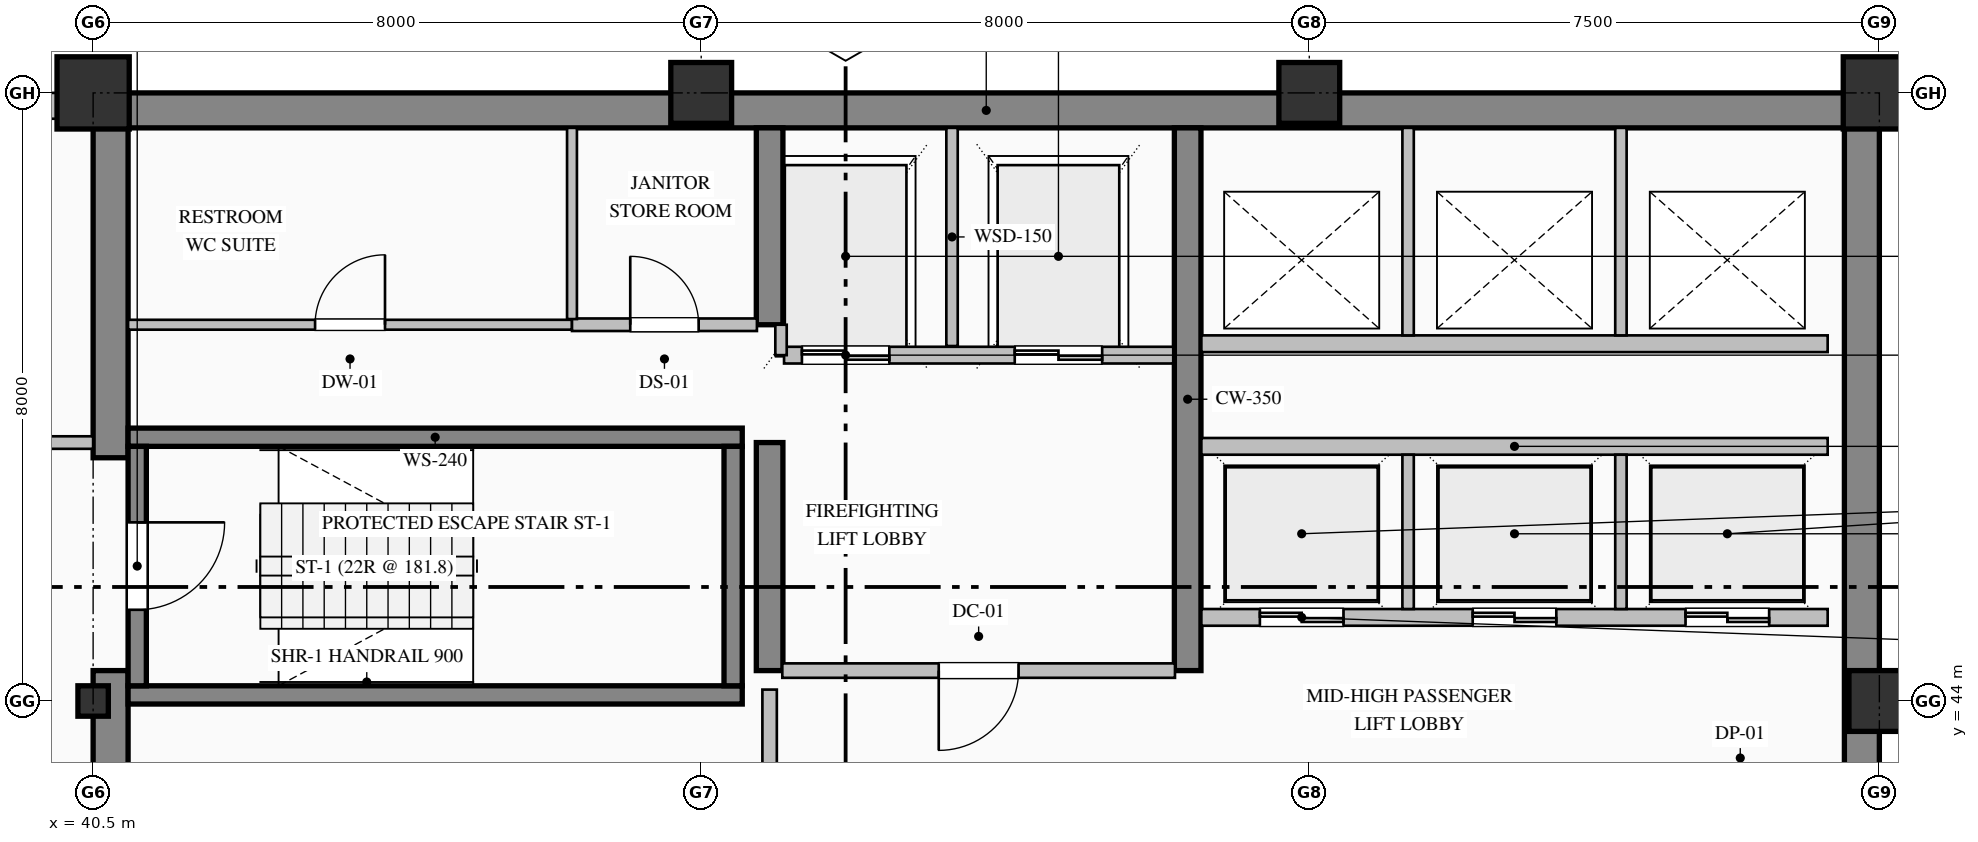
"""IFC4 building model, lengths in metres.
Left out: names, types, materials, properties, quantities, classifications, styles, units other than length and angle.
Written with IfcOpenShell. Run it as: python <this file> out.ifc"""

import sys

from ifc_helpers import new_model, si_unit, direction, frame, frame_2d, origin, origin_2d, place, context, subcontext, project, spatial, rectangle, hollow_rectangle, i_section, extrude, element, fill, save


model = new_model("IFC4")
c1 = context("Model", 3, precision=1e-05, world=origin(), true_north=direction((0.0, 1.0)))
c2 = subcontext(c1, "Body", "Model", "MODEL_VIEW")
j1 = project(units=[si_unit("LENGTHUNIT", "METRE"), si_unit("PLANEANGLEUNIT", "RADIAN")], contexts=[c1])
p1 = place(None, origin())
s1 = spatial("IfcSite", under=j1, at=p1, CompositionType="ELEMENT")
p2 = place(p1, origin())
s2 = spatial("IfcBuilding", under=s1, at=p2, CompositionType="ELEMENT")
p3 = place(p2, frame((0.0, 0.0, 273.8)))
s3 = spatial("IfcBuildingStorey", under=s2, at=p3, CompositionType="ELEMENT", Elevation=273.8)
p4 = place(p3, frame((40.5, 51.77, 0.0), z_axis=(0.0, 0.0, 1.0), x_axis=(1.0, 0.0, 0.0)))
e1 = element("IfcWall", 1, at=p4, inside=s3, PredefinedType="SHEAR", context=c2, shape_type="SweptSolid", body=[
    extrude(rectangle(XDim=23.5, YDim=0.46, at=frame_2d((11.75, 0.0))), origin(), (0.0, 0.0, 1.0), 3.775),
])
p5 = place(p3, frame((63.77, 36.32, 0.0), z_axis=(0.0, 0.0, 1.0), x_axis=(0.0, 1.0, 0.0)))
e2 = element("IfcWall", 2, at=p5, inside=s3, PredefinedType="SHEAR", context=c2, shape_type="SweptSolid", body=[
    extrude(rectangle(XDim=15.22, YDim=0.46, at=frame_2d((7.61, 0.0))), origin(), (0.0, 0.0, 1.0), 3.775),
])
p6 = place(p3, frame((40.73, 36.46, 0.0), z_axis=(0.0, 0.0, 1.0), x_axis=(0.0, 1.0, 0.0)))
e3 = element("IfcWall", 3, at=p6, inside=s3, PredefinedType="SHEAR", context=c2, shape_type="SweptSolid", body=[
    extrude(rectangle(XDim=7.94, YDim=0.46, at=frame_2d((3.97, 0.0))), origin(), (0.0, 0.0, 1.0), 3.775),
])
p7 = place(p3, frame((40.73, 47.2, 0.0), z_axis=(0.0, 0.0, 1.0), x_axis=(0.0, 1.0, 0.0)))
e4 = element("IfcWall", 4, at=p7, inside=s3, PredefinedType="SHEAR", context=c2, shape_type="SweptSolid", body=[
    extrude(rectangle(XDim=4.34, YDim=0.46, at=frame_2d((2.17, 0.0))), origin(), (0.0, 0.0, 1.0), 3.775),
])
p8 = place(p3, frame((49.4, 44.4, 0.0), z_axis=(0.0, 0.0, 1.0), x_axis=(0.0, 1.0, 0.0)))
e5 = element("IfcWall", 5, at=p8, inside=s3, PredefinedType="SHEAR", context=c2, shape_type="SweptSolid", body=[
    extrude(rectangle(XDim=3.0, YDim=0.35, at=frame_2d((1.5, 0.0))), origin(), (0.0, 0.0, 1.0), 3.775),
])
p9 = place(p3, frame((49.4, 48.95, 0.0), z_axis=(0.0, 0.0, 1.0), x_axis=(0.0, 1.0, 0.0)))
e6 = element("IfcWall", 6, at=p9, inside=s3, PredefinedType="SHEAR", context=c2, shape_type="SweptSolid", body=[
    extrude(rectangle(XDim=2.59, YDim=0.35, at=frame_2d((1.295, 0.0))), origin(), (0.0, 0.0, 1.0), 3.775),
])
p10 = place(p3, frame((54.9, 44.4, 0.0), z_axis=(0.0, 0.0, 1.0), x_axis=(0.0, 1.0, 0.0)))
e7 = element("IfcWall", 7, at=p10, inside=s3, PredefinedType="SHEAR", context=c2, shape_type="SweptSolid", body=[
    extrude(rectangle(XDim=7.14, YDim=0.35, at=frame_2d((3.57, 0.0))), origin(), (0.0, 0.0, 1.0), 3.775),
])
p11 = place(p3, frame((40.5, 44.0, 0.0), z_axis=(0.0, 0.0, 1.0), x_axis=(1.0, 0.0, 0.0)))
e8 = element("IfcColumn", 8, at=p11, inside=s3, PredefinedType="COLUMN", context=c2, shape_type="SweptSolid", body=[
    extrude(i_section(OverallWidth=0.4, OverallDepth=0.4, WebThickness=0.013, FlangeThickness=0.021, FilletRadius=0.022, at=origin_2d()), origin(), (0.0, 0.0, 1.0), 4.0),
])
p12 = place(p3, frame((40.5, 52.0, 0.0), z_axis=(0.0, 0.0, 1.0), x_axis=(1.0, 0.0, 0.0)))
e9 = element("IfcColumn", 9, at=p12, inside=s3, PredefinedType="COLUMN", context=c2, shape_type="SweptSolid", body=[
    extrude(hollow_rectangle(XDim=0.95, YDim=0.95, WallThickness=0.036, at=origin_2d()), origin(), (0.0, 0.0, 1.0), 4.0),
])
for number, where, z_axis, x_axis in (
    (10, (48.5, 52.0, 0.0), (0.0, 0.0, 1.0), (1.0, 0.0, 0.0)),
    (11, (56.5, 52.0, 0.0), (0.0, 0.0, 1.0), (1.0, 0.0, 0.0)),
    (12, (64.0, 44.0, 0.0), (0.0, 0.0, 1.0), (1.0, 0.0, 0.0)),
):
    element("IfcColumn", number, at=place(p3, frame(where, z_axis=z_axis, x_axis=x_axis)), inside=s3, PredefinedType="COLUMN", context=c2, shape_type="SweptSolid", body=[
        extrude(hollow_rectangle(XDim=0.8, YDim=0.8, WallThickness=0.032, at=origin_2d()), origin(), (0.0, 0.0, 1.0), 4.0),
    ])
p13 = place(p3, frame((64.0, 52.0, 0.0), z_axis=(0.0, 0.0, 1.0), x_axis=(1.0, 0.0, 0.0)))
e13 = element("IfcColumn", 13, at=p13, inside=s3, PredefinedType="COLUMN", context=c2, shape_type="SweptSolid", body=[
    extrude(hollow_rectangle(XDim=0.95, YDim=0.95, WallThickness=0.036, at=origin_2d()), origin(), (0.0, 0.0, 1.0), 4.0),
])
p14 = place(p3, frame((13.0, 51.83, 0.0), z_axis=(0.0, 0.0, 1.0), x_axis=(1.0, 0.0, 0.0)))
e14 = element("IfcWall", 14, at=p14, inside=s3, PredefinedType="SOLIDWALL", context=c2, shape_type="SweptSolid", body=[
    extrude(rectangle(XDim=27.52, YDim=0.34, at=frame_2d((13.76, 0.0))), origin(), (0.0, 0.0, 1.0), 3.325),
])
p15 = place(p14, frame((6.6, 0.0, 0.9)))
e15 = element("IfcOpeningElement", 15, at=p15, cuts=e14, PredefinedType="OPENING", context=c2, shape_type="SweptSolid", body=[
    extrude(rectangle(XDim=1.2, YDim=1.85, at=frame_2d((0.6, 0.925))), frame((0.0, 0.18, 0.0), z_axis=(0.0, -1.0, 0.0), x_axis=(1.0, 0.0, 0.0)), (0.0, 0.0, 1.0), 0.36),
])
p16 = place(p14, frame((17.4, 0.0, 0.9)))
e16 = element("IfcOpeningElement", 16, at=p16, cuts=e14, PredefinedType="OPENING", context=c2, shape_type="SweptSolid", body=[
    extrude(rectangle(XDim=1.2, YDim=1.85, at=frame_2d((0.6, 0.925))), frame((0.0, 0.18, 0.0), z_axis=(0.0, -1.0, 0.0), x_axis=(1.0, 0.0, 0.0)), (0.0, 0.0, 1.0), 0.36),
])
for number, where, z_axis, x_axis in (
    (17, (40.96, 47.47, 0.0), (0.0, 0.0, 1.0), (1.0, 0.0, 0.0)),
    (18, (49.04, 44.08, 0.0), (0.0, 0.0, 1.0), (-1.0, 0.0, 0.0)),
):
    element("IfcWall", number, at=place(p3, frame(where, z_axis=z_axis, x_axis=x_axis)), inside=s3, PredefinedType="SOLIDWALL", context=c2, shape_type="SweptSolid", body=[
        extrude(rectangle(XDim=8.08, YDim=0.24, at=frame_2d((4.04, 0.0))), origin(), (0.0, 0.0, 1.0), 4.0),
    ])
p17 = place(p3, frame((41.08, 47.35, 0.0), z_axis=(0.0, 0.0, 1.0), x_axis=(0.0, -1.0, 0.0)))
e19 = element("IfcWall", 19, at=p17, inside=s3, PredefinedType="SOLIDWALL", context=c2, shape_type="SweptSolid", body=[
    extrude(rectangle(XDim=3.15, YDim=0.24, at=frame_2d((1.575, 0.0))), origin(), (0.0, 0.0, 1.0), 4.0),
])
p18 = place(p17, frame((1.0, 0.0, 0.0)))
e20 = element("IfcOpeningElement", 20, at=p18, cuts=e19, PredefinedType="OPENING", context=c2, shape_type="SweptSolid", body=[
    extrude(rectangle(XDim=1.15, YDim=2.2, at=frame_2d((0.575, 1.1))), frame((0.0, 0.13, 0.0), z_axis=(0.0, -1.0, 0.0), x_axis=(1.0, 0.0, 0.0)), (0.0, 0.0, 1.0), 0.26),
])
p19 = place(p3, frame((48.92, 44.2, 0.0), z_axis=(0.0, 0.0, 1.0), x_axis=(0.0, 1.0, 0.0)))
e21 = element("IfcWall", 21, at=p19, inside=s3, PredefinedType="SOLIDWALL", context=c2, shape_type="SweptSolid", body=[
    extrude(rectangle(XDim=3.15, YDim=0.24, at=frame_2d((1.575, 0.0))), origin(), (0.0, 0.0, 1.0), 4.0),
])
p20 = place(p3, frame((54.71, 48.55, 0.0), z_axis=(0.0, 0.0, 1.0), x_axis=(-1.0, 0.0, 0.0)))
e22 = element("IfcWall", 22, at=p20, inside=s3, PredefinedType="PARTITIONING", context=c2, shape_type="SweptSolid", body=[
    extrude(rectangle(XDim=5.12, YDim=0.22, at=frame_2d((2.56, 0.0))), origin(), (0.0, 0.0, 1.0), 3.775),
])
p21 = place(p20, frame((3.735, 0.0, 0.0)))
e23 = element("IfcOpeningElement", 23, at=p21, cuts=e22, PredefinedType="OPENING", context=c2, shape_type="SweptSolid", body=[
    extrude(rectangle(XDim=1.15, YDim=2.2, at=frame_2d((0.575, 1.1))), frame((0.0, 0.12, 0.0), z_axis=(0.0, -1.0, 0.0), x_axis=(1.0, 0.0, 0.0)), (0.0, 0.0, 1.0), 0.24),
])
p22 = place(p20, frame((0.935, 0.0, 0.0)))
e24 = element("IfcOpeningElement", 24, at=p22, cuts=e22, PredefinedType="OPENING", context=c2, shape_type="SweptSolid", body=[
    extrude(rectangle(XDim=1.15, YDim=2.2, at=frame_2d((0.575, 1.1))), frame((0.0, 0.12, 0.0), z_axis=(0.0, -1.0, 0.0), x_axis=(1.0, 0.0, 0.0)), (0.0, 0.0, 1.0), 0.24),
])
p23 = place(p3, frame((51.8, 48.67, 0.0), z_axis=(0.0, 0.0, 1.0), x_axis=(0.0, 1.0, 0.0)))
e25 = element("IfcWall", 25, at=p23, inside=s3, PredefinedType="PARTITIONING", context=c2, shape_type="SweptSolid", body=[
    extrude(rectangle(XDim=2.87, YDim=0.15, at=frame_2d((1.435, 0.0))), origin(), (0.0, 0.0, 1.0), 3.775),
])
p24 = place(p3, frame((49.55, 48.55, 0.0), z_axis=(0.0, 0.0, 1.0), x_axis=(0.0, 1.0, 0.0)))
e26 = element("IfcWall", 26, at=p24, inside=s3, PredefinedType="PARTITIONING", context=c2, shape_type="SweptSolid", body=[
    extrude(rectangle(XDim=0.4, YDim=0.15, at=frame_2d((0.2, 0.0))), origin(), (0.0, 0.0, 1.0), 3.775),
])
p25 = place(p3, frame((63.32, 45.1, 0.0), z_axis=(0.0, 0.0, 1.0), x_axis=(-1.0, 0.0, 0.0)))
e27 = element("IfcWall", 27, at=p25, inside=s3, PredefinedType="PARTITIONING", context=c2, shape_type="SweptSolid", body=[
    extrude(rectangle(XDim=8.24, YDim=0.22, at=frame_2d((4.12, 0.0))), origin(), (0.0, 0.0, 1.0), 3.775),
])
p26 = place(p25, frame((6.37, 0.0, 0.0)))
e28 = element("IfcOpeningElement", 28, at=p26, cuts=e27, PredefinedType="OPENING", context=c2, shape_type="SweptSolid", body=[
    extrude(rectangle(XDim=1.1, YDim=2.2, at=frame_2d((0.55, 1.1))), frame((0.0, 0.12, 0.0), z_axis=(0.0, -1.0, 0.0), x_axis=(1.0, 0.0, 0.0)), (0.0, 0.0, 1.0), 0.24),
])
p27 = place(p25, frame((3.57, 0.0, 0.0)))
e29 = element("IfcOpeningElement", 29, at=p27, cuts=e27, PredefinedType="OPENING", context=c2, shape_type="SweptSolid", body=[
    extrude(rectangle(XDim=1.1, YDim=2.2, at=frame_2d((0.55, 1.1))), frame((0.0, 0.12, 0.0), z_axis=(0.0, -1.0, 0.0), x_axis=(1.0, 0.0, 0.0)), (0.0, 0.0, 1.0), 0.24),
])
p28 = place(p25, frame((0.77, 0.0, 0.0)))
e30 = element("IfcOpeningElement", 30, at=p28, cuts=e27, PredefinedType="OPENING", context=c2, shape_type="SweptSolid", body=[
    extrude(rectangle(XDim=1.1, YDim=2.2, at=frame_2d((0.55, 1.1))), frame((0.0, 0.12, 0.0), z_axis=(0.0, -1.0, 0.0), x_axis=(1.0, 0.0, 0.0)), (0.0, 0.0, 1.0), 0.24),
])
p29 = place(p3, frame((55.08, 47.35, 0.0), z_axis=(0.0, 0.0, 1.0), x_axis=(1.0, 0.0, 0.0)))
e31 = element("IfcWall", 31, at=p29, inside=s3, PredefinedType="PARTITIONING", context=c2, shape_type="SweptSolid", body=[
    extrude(rectangle(XDim=8.24, YDim=0.22, at=frame_2d((4.12, 0.0))), origin(), (0.0, 0.0, 1.0), 3.775),
])
for number, where, z_axis, x_axis in (
    (32, (57.8, 45.21, 0.0), (0.0, 0.0, 1.0), (0.0, 1.0, 0.0)),
    (33, (60.6, 45.21, 0.0), (0.0, 0.0, 1.0), (0.0, 1.0, 0.0)),
):
    element("IfcWall", number, at=place(p3, frame(where, z_axis=z_axis, x_axis=x_axis)), inside=s3, PredefinedType="PARTITIONING", context=c2, shape_type="SweptSolid", body=[
        extrude(rectangle(XDim=2.03, YDim=0.15, at=frame_2d((1.015, 0.0))), origin(), (0.0, 0.0, 1.0), 3.775),
    ])
p30 = place(p3, frame((63.32, 48.7, 0.0), z_axis=(0.0, 0.0, 1.0), x_axis=(-1.0, 0.0, 0.0)))
e34 = element("IfcWall", 34, at=p30, inside=s3, PredefinedType="PARTITIONING", context=c2, shape_type="SweptSolid", body=[
    extrude(rectangle(XDim=8.24, YDim=0.22, at=frame_2d((4.12, 0.0))), origin(), (0.0, 0.0, 1.0), 3.775),
])
for number, where, z_axis, x_axis in (
    (35, (57.8, 48.81, 0.0), (0.0, 0.0, 1.0), (0.0, 1.0, 0.0)),
    (36, (60.6, 48.81, 0.0), (0.0, 0.0, 1.0), (0.0, 1.0, 0.0)),
):
    element("IfcWall", number, at=place(p3, frame(where, z_axis=z_axis, x_axis=x_axis)), inside=s3, PredefinedType="PARTITIONING", context=c2, shape_type="SweptSolid", body=[
        extrude(rectangle(XDim=2.73, YDim=0.15, at=frame_2d((1.365, 0.0))), origin(), (0.0, 0.0, 1.0), 3.775),
    ])
p31 = place(p3, frame((37.8, 47.4, 0.0), z_axis=(0.0, 0.0, 1.0), x_axis=(1.0, 0.0, 0.0)))
e37 = element("IfcWall", 37, at=p31, inside=s3, PredefinedType="PARTITIONING", context=c2, shape_type="SweptSolid", body=[
    extrude(rectangle(XDim=2.7, YDim=0.165, at=frame_2d((1.35, 0.0))), origin(), (0.0, 0.0, 1.0), 3.775),
])
p32 = place(p31, frame((0.825, 0.0, 0.0)))
e38 = element("IfcOpeningElement", 38, at=p32, cuts=e37, PredefinedType="OPENING", context=c2, shape_type="SweptSolid", body=[
    extrude(rectangle(XDim=1.05, YDim=2.15, at=frame_2d((0.525, 1.075))), frame((0.0, 0.093, 0.0), z_axis=(0.0, -1.0, 0.0), x_axis=(1.0, 0.0, 0.0)), (0.0, 0.0, 1.0), 0.185),
])
p33 = place(p3, frame((40.96, 48.95, 0.0), z_axis=(0.0, 0.0, 1.0), x_axis=(1.0, 0.0, 0.0)))
e39 = element("IfcWall", 39, at=p33, inside=s3, PredefinedType="PARTITIONING", context=c2, shape_type="SweptSolid", body=[
    extrude(rectangle(XDim=5.84, YDim=0.13, at=frame_2d((2.92, 0.0))), origin(), (0.0, 0.0, 1.0), 3.775),
])
p34 = place(p33, frame((2.46, 0.0, 0.0)))
e40 = element("IfcOpeningElement", 40, at=p34, cuts=e39, PredefinedType="OPENING", context=c2, shape_type="SweptSolid", body=[
    extrude(rectangle(XDim=0.92, YDim=2.15, at=frame_2d((0.46, 1.075))), frame((0.0, 0.075, 0.0), z_axis=(0.0, -1.0, 0.0), x_axis=(1.0, 0.0, 0.0)), (0.0, 0.0, 1.0), 0.15),
])
p35 = place(p3, frame((46.8, 48.95, 0.0), z_axis=(0.0, 0.0, 1.0), x_axis=(1.0, 0.0, 0.0)))
e41 = element("IfcWall", 41, at=p35, inside=s3, PredefinedType="PARTITIONING", context=c2, shape_type="SweptSolid", body=[
    extrude(rectangle(XDim=2.433, YDim=0.165, at=frame_2d((1.216, 0.0))), origin(), (0.0, 0.0, 1.0), 3.775),
])
p36 = place(p35, frame((0.767, 0.0, 0.0)))
e42 = element("IfcOpeningElement", 42, at=p36, cuts=e41, PredefinedType="OPENING", context=c2, shape_type="SweptSolid", body=[
    extrude(rectangle(XDim=0.9, YDim=2.15, at=frame_2d((0.45, 1.075))), frame((0.0, 0.093, 0.0), z_axis=(0.0, -1.0, 0.0), x_axis=(1.0, 0.0, 0.0)), (0.0, 0.0, 1.0), 0.185),
])
p37 = place(p3, frame((54.733, 44.4, 0.0), z_axis=(0.0, 0.0, 1.0), x_axis=(-1.0, 0.0, 0.0)))
e43 = element("IfcWall", 43, at=p37, inside=s3, PredefinedType="PARTITIONING", context=c2, shape_type="SweptSolid", body=[
    extrude(rectangle(XDim=5.166, YDim=0.19, at=frame_2d((2.583, 0.0))), origin(), (0.0, 0.0, 1.0), 3.775),
])
p38 = place(p37, frame((2.058, 0.0, 0.0)))
e44 = element("IfcOpeningElement", 44, at=p38, cuts=e43, PredefinedType="OPENING", context=c2, shape_type="SweptSolid", body=[
    extrude(rectangle(XDim=1.05, YDim=2.15, at=frame_2d((0.525, 1.075))), frame((0.0, 0.105, 0.0), z_axis=(0.0, -1.0, 0.0), x_axis=(1.0, 0.0, 0.0)), (0.0, 0.0, 1.0), 0.21),
])
p39 = place(p3, frame((49.4, 40.487, 0.0), z_axis=(0.0, 0.0, 1.0), x_axis=(0.0, 1.0, 0.0)))
e45 = element("IfcWall", 45, at=p39, inside=s3, PredefinedType="PARTITIONING", context=c2, shape_type="SweptSolid", body=[
    extrude(rectangle(XDim=3.663, YDim=0.19, at=frame_2d((1.832, 0.0))), origin(), (0.0, 0.0, 1.0), 3.017),
])
p40 = place(p39, frame((1.132, 0.0, 0.0)))
e46 = element("IfcOpeningElement", 46, at=p40, cuts=e45, PredefinedType="OPENING", context=c2, shape_type="SweptSolid", body=[
    extrude(rectangle(XDim=1.4, YDim=2.25, at=frame_2d((0.7, 1.125))), frame((0.0, 0.105, 0.0), z_axis=(0.0, -1.0, 0.0), x_axis=(1.0, 0.0, 0.0)), (0.0, 0.0, 1.0), 0.21),
])
p41 = place(p3, frame((46.8, 51.54, 0.0), z_axis=(0.0, 0.0, 1.0), x_axis=(0.0, -1.0, 0.0)))
e47 = element("IfcWall", 47, at=p41, inside=s3, PredefinedType="PARTITIONING", context=c2, shape_type="SweptSolid", body=[
    extrude(rectangle(XDim=2.516, YDim=0.13, at=frame_2d((1.258, 0.0))), origin(), (0.0, 0.0, 1.0), 3.775),
])
p42 = place(p18, origin())
e48 = element("IfcDoor", 48, at=p42, inside=s3, OperationType="SINGLE_SWING_LEFT", PredefinedType="DOOR", context=c2, shape_type="SweptSolid", body=[
    extrude(rectangle(XDim=1.15, YDim=2.2, at=frame_2d((0.575, 1.1))), frame((0.0, 0.025, 0.0), z_axis=(0.0, -1.0, 0.0), x_axis=(1.0, 0.0, 0.0)), (0.0, 0.0, 1.0), 0.05),
])
fill(e20, e48)
p43 = place(p21, origin())
e49 = element("IfcDoor", 49, at=p43, inside=s3, OperationType="DOUBLE_DOOR_SLIDING", PredefinedType="DOOR", context=c2, shape_type="SweptSolid", body=[
    extrude(rectangle(XDim=1.15, YDim=2.2, at=frame_2d((0.575, 1.1))), frame((0.0, 0.025, 0.0), z_axis=(0.0, -1.0, 0.0), x_axis=(1.0, 0.0, 0.0)), (0.0, 0.0, 1.0), 0.05),
])
fill(e23, e49)
p44 = place(p22, origin())
e50 = element("IfcDoor", 50, at=p44, inside=s3, OperationType="DOUBLE_DOOR_SLIDING", PredefinedType="DOOR", context=c2, shape_type="SweptSolid", body=[
    extrude(rectangle(XDim=1.15, YDim=2.2, at=frame_2d((0.575, 1.1))), frame((0.0, 0.025, 0.0), z_axis=(0.0, -1.0, 0.0), x_axis=(1.0, 0.0, 0.0)), (0.0, 0.0, 1.0), 0.05),
])
fill(e24, e50)
p45 = place(p26, origin())
e51 = element("IfcDoor", 51, at=p45, inside=s3, OperationType="DOUBLE_DOOR_SLIDING", PredefinedType="DOOR", context=c2, shape_type="SweptSolid", body=[
    extrude(rectangle(XDim=1.1, YDim=2.2, at=frame_2d((0.55, 1.1))), frame((0.0, 0.025, 0.0), z_axis=(0.0, -1.0, 0.0), x_axis=(1.0, 0.0, 0.0)), (0.0, 0.0, 1.0), 0.05),
])
fill(e28, e51)
p46 = place(p27, origin())
e52 = element("IfcDoor", 52, at=p46, inside=s3, OperationType="DOUBLE_DOOR_SLIDING", PredefinedType="DOOR", context=c2, shape_type="SweptSolid", body=[
    extrude(rectangle(XDim=1.1, YDim=2.2, at=frame_2d((0.55, 1.1))), frame((0.0, 0.025, 0.0), z_axis=(0.0, -1.0, 0.0), x_axis=(1.0, 0.0, 0.0)), (0.0, 0.0, 1.0), 0.05),
])
fill(e29, e52)
p47 = place(p28, origin())
e53 = element("IfcDoor", 53, at=p47, inside=s3, OperationType="DOUBLE_DOOR_SLIDING", PredefinedType="DOOR", context=c2, shape_type="SweptSolid", body=[
    extrude(rectangle(XDim=1.1, YDim=2.2, at=frame_2d((0.55, 1.1))), frame((0.0, 0.025, 0.0), z_axis=(0.0, -1.0, 0.0), x_axis=(1.0, 0.0, 0.0)), (0.0, 0.0, 1.0), 0.05),
])
fill(e30, e53)
p48 = place(p38, origin())
e54 = element("IfcDoor", 54, at=p48, inside=s3, OperationType="SINGLE_SWING_RIGHT", PredefinedType="DOOR", context=c2, shape_type="SweptSolid", body=[
    extrude(rectangle(XDim=1.05, YDim=2.15, at=frame_2d((0.525, 1.075))), frame((0.0, 0.025, 0.0), z_axis=(0.0, -1.0, 0.0), x_axis=(1.0, 0.0, 0.0)), (0.0, 0.0, 1.0), 0.05),
])
fill(e44, e54)
p49 = place(p34, origin())
e55 = element("IfcDoor", 55, at=p49, inside=s3, OperationType="SINGLE_SWING_RIGHT", PredefinedType="DOOR", context=c2, shape_type="SweptSolid", body=[
    extrude(rectangle(XDim=0.92, YDim=2.15, at=frame_2d((0.46, 1.075))), frame((0.0, 0.025, 0.0), z_axis=(0.0, -1.0, 0.0), x_axis=(1.0, 0.0, 0.0)), (0.0, 0.0, 1.0), 0.05),
])
fill(e40, e55)
p50 = place(p36, origin())
e56 = element("IfcDoor", 56, at=p50, inside=s3, OperationType="SINGLE_SWING_LEFT", PredefinedType="DOOR", context=c2, shape_type="SweptSolid", body=[
    extrude(rectangle(XDim=0.9, YDim=2.15, at=frame_2d((0.45, 1.075))), frame((0.0, 0.025, 0.0), z_axis=(0.0, -1.0, 0.0), x_axis=(1.0, 0.0, 0.0)), (0.0, 0.0, 1.0), 0.05),
])
fill(e42, e56)
save(model, sys.argv[1])
